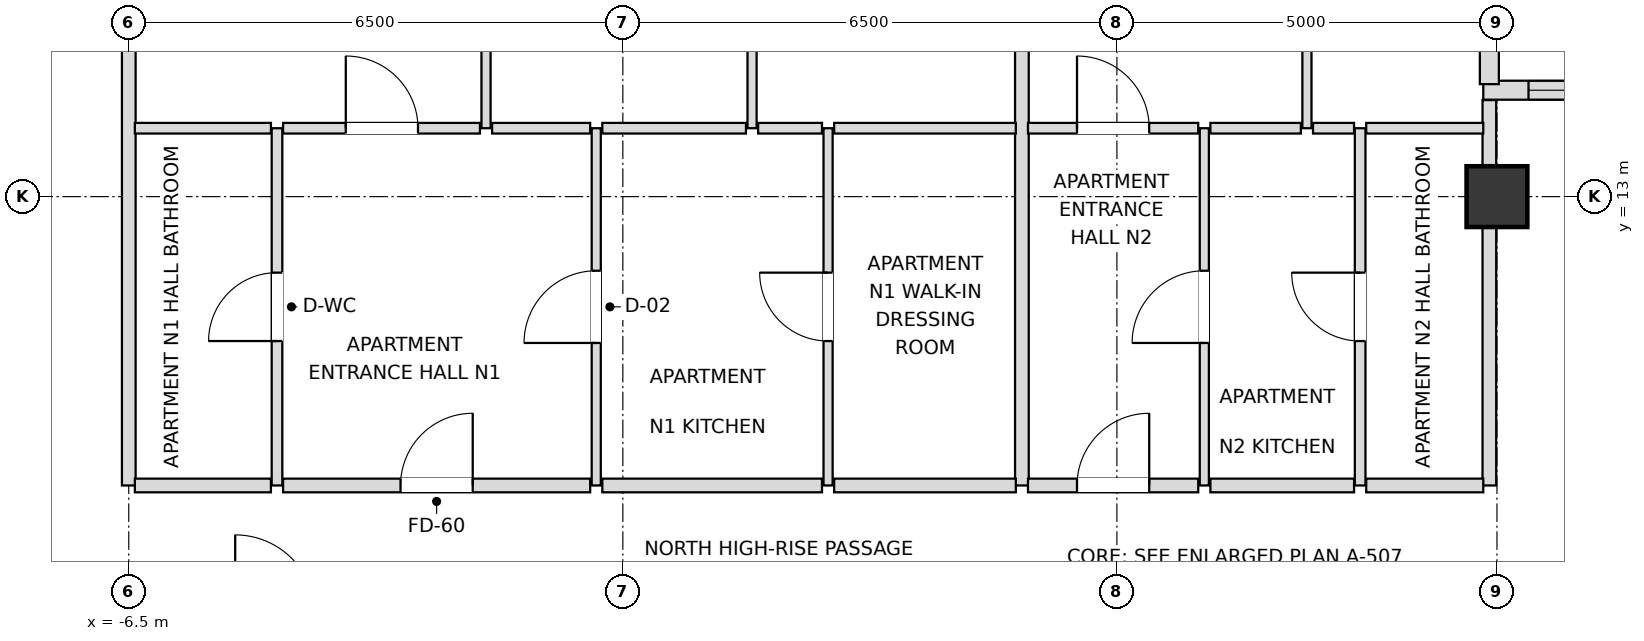
"""IFC4 building model, lengths in metres.
Left out: names, types, materials, properties, quantities, classifications, styles, units other than length and angle.
Written with IfcOpenShell. Run it as: python <this file> out.ifc"""

import sys

from ifc_helpers import new_model, si_unit, direction, frame, frame_2d, origin, origin_2d, place, context, subcontext, project, spatial, rectangle, extrude, element, fill, save


model = new_model("IFC4")
c1 = context("Model", 3, precision=1e-05, world=origin(), true_north=direction((0.0, 1.0)))
c2 = subcontext(c1, "Body", "Model", "MODEL_VIEW")
j1 = project(units=[si_unit("LENGTHUNIT", "METRE"), si_unit("PLANEANGLEUNIT", "RADIAN")], contexts=[c1])
p1 = place(None, origin())
s1 = spatial("IfcSite", under=j1, at=p1, CompositionType="ELEMENT")
p2 = place(p1, origin())
s2 = spatial("IfcBuilding", under=s1, at=p2, CompositionType="ELEMENT")
p3 = place(p2, frame((0.0, 0.0, 229.5)))
s3 = spatial("IfcBuildingStorey", under=s2, at=p3, CompositionType="ELEMENT", Elevation=229.5)
p4 = place(p3, frame((11.5, 13.0, 0.0), z_axis=(0.0, 0.0, 1.0), x_axis=(1.0, 0.0, 0.0)))
e1 = element("IfcColumn", 1, at=p4, inside=s3, PredefinedType="COLUMN", context=c2, shape_type="SweptSolid", body=[
    extrude(rectangle(XDim=0.8, YDim=0.8, at=origin_2d()), origin(), (0.0, 0.0, 1.0), 3.6),
])
p5 = place(p3, frame((16.98, 14.4, 0.0), z_axis=(0.0, 0.0, 1.0), x_axis=(-1.0, 0.0, 0.0)))
e2 = element("IfcWall", 2, at=p5, inside=s3, PredefinedType="SOLIDWALL", context=c2, shape_type="SweptSolid", body=[
    extrude(rectangle(XDim=5.66, YDim=0.25, at=frame_2d((2.83, 0.0))), origin(), (0.0, 0.0, 1.0), 2.748),
])
p6 = place(p5, frame((0.595, 0.0, 0.72)))
e3 = element("IfcOpeningElement", 3, at=p6, cuts=e2, PredefinedType="OPENING", context=c2, shape_type="SweptSolid", body=[
    extrude(rectangle(XDim=1.8, YDim=1.68, at=frame_2d((0.9, 0.84))), frame((0.0, 0.135, 0.0), z_axis=(0.0, -1.0, 0.0), x_axis=(1.0, 0.0, 0.0)), (0.0, 0.0, 1.0), 0.27),
])
p7 = place(p5, frame((3.265, 0.0, 0.72)))
e4 = element("IfcOpeningElement", 4, at=p7, cuts=e2, PredefinedType="OPENING", context=c2, shape_type="SweptSolid", body=[
    extrude(rectangle(XDim=1.8, YDim=1.68, at=frame_2d((0.9, 0.84))), frame((0.0, 0.135, 0.0), z_axis=(0.0, -1.0, 0.0), x_axis=(1.0, 0.0, 0.0)), (0.0, 0.0, 1.0), 0.27),
])
p8 = place(p3, frame((11.4, 14.48, 0.0), z_axis=(0.0, 0.0, 1.0), x_axis=(0.0, 1.0, 0.0)))
e5 = element("IfcWall", 5, at=p8, inside=s3, PredefinedType="SOLIDWALL", context=c2, shape_type="SweptSolid", body=[
    extrude(rectangle(XDim=5.34, YDim=0.25, at=frame_2d((2.67, 0.0))), origin(), (0.0, 0.0, 1.0), 2.748),
])
p9 = place(p8, frame((1.615, 0.0, 0.72)))
e6 = element("IfcOpeningElement", 6, at=p9, cuts=e5, PredefinedType="OPENING", context=c2, shape_type="SweptSolid", body=[
    extrude(rectangle(XDim=1.8, YDim=1.68, at=frame_2d((0.9, 0.84))), frame((0.0, 0.135, 0.0), z_axis=(0.0, -1.0, 0.0), x_axis=(1.0, 0.0, 0.0)), (0.0, 0.0, 1.0), 0.27),
])
p10 = place(p3, frame((-6.5, 9.2, 0.0), z_axis=(0.0, 0.0, 1.0), x_axis=(0.0, 1.0, 0.0)))
e7 = element("IfcWall", 7, at=p10, inside=s3, PredefinedType="PARTITIONING", context=c2, shape_type="SweptSolid", body=[
    extrude(rectangle(XDim=10.7, YDim=0.18, at=frame_2d((5.35, 0.0))), origin(), (0.0, 0.0, 1.0), 2.826),
])
p11 = place(p3, frame((-4.55, 9.2, 0.0), z_axis=(0.0, 0.0, 1.0), x_axis=(0.0, 1.0, 0.0)))
e8 = element("IfcWall", 8, at=p11, inside=s3, PredefinedType="PARTITIONING", context=c2, shape_type="SweptSolid", body=[
    extrude(rectangle(XDim=4.7, YDim=0.14, at=frame_2d((2.35, 0.0))), origin(), (0.0, 0.0, 1.0), 3.38),
])
p12 = place(p11, frame((1.9, 0.0, 0.0)))
e9 = element("IfcOpeningElement", 9, at=p12, cuts=e8, PredefinedType="OPENING", context=c2, shape_type="SweptSolid", body=[
    extrude(rectangle(XDim=0.9, YDim=2.1, at=frame_2d((0.45, 1.05))), frame((0.0, 0.08, 0.0), z_axis=(0.0, -1.0, 0.0), x_axis=(1.0, 0.0, 0.0)), (0.0, 0.0, 1.0), 0.16),
])
p13 = place(p3, frame((-1.8, 13.9, 0.0), z_axis=(0.0, 0.0, 1.0), x_axis=(0.0, 1.0, 0.0)))
e10 = element("IfcWall", 10, at=p13, inside=s3, PredefinedType="PARTITIONING", context=c2, shape_type="SweptSolid", body=[
    extrude(rectangle(XDim=6.0, YDim=0.12, at=frame_2d((3.0, 0.0))), origin(), (0.0, 0.0, 1.0), 3.018),
])
p14 = place(p13, frame((2.55, 0.0, 0.0)))
e11 = element("IfcOpeningElement", 11, at=p14, cuts=e10, PredefinedType="OPENING", context=c2, shape_type="SweptSolid", body=[
    extrude(rectangle(XDim=0.9, YDim=2.1, at=frame_2d((0.45, 1.05))), frame((0.0, 0.07, 0.0), z_axis=(0.0, -1.0, 0.0), x_axis=(1.0, 0.0, 0.0)), (0.0, 0.0, 1.0), 0.14),
])
p15 = place(p3, frame((-0.35, 9.2, 0.0), z_axis=(0.0, 0.0, 1.0), x_axis=(0.0, 1.0, 0.0)))
e12 = element("IfcWall", 12, at=p15, inside=s3, PredefinedType="PARTITIONING", context=c2, shape_type="SweptSolid", body=[
    extrude(rectangle(XDim=4.7, YDim=0.12, at=frame_2d((2.35, 0.0))), origin(), (0.0, 0.0, 1.0), 3.38),
])
p16 = place(p15, frame((1.875, 0.0, 0.0)))
e13 = element("IfcOpeningElement", 13, at=p16, cuts=e12, PredefinedType="OPENING", context=c2, shape_type="SweptSolid", body=[
    extrude(rectangle(XDim=0.95, YDim=2.1, at=frame_2d((0.475, 1.05))), frame((0.0, 0.07, 0.0), z_axis=(0.0, -1.0, 0.0), x_axis=(1.0, 0.0, 0.0)), (0.0, 0.0, 1.0), 0.14),
])
p17 = place(p3, frame((1.7, 13.9, 0.0), z_axis=(0.0, 0.0, 1.0), x_axis=(0.0, 1.0, 0.0)))
e14 = element("IfcWall", 14, at=p17, inside=s3, PredefinedType="PARTITIONING", context=c2, shape_type="SweptSolid", body=[
    extrude(rectangle(XDim=6.0, YDim=0.12, at=frame_2d((3.0, 0.0))), origin(), (0.0, 0.0, 1.0), 3.018),
])
p18 = place(p17, frame((2.55, 0.0, 0.0)))
e15 = element("IfcOpeningElement", 15, at=p18, cuts=e14, PredefinedType="OPENING", context=c2, shape_type="SweptSolid", body=[
    extrude(rectangle(XDim=0.9, YDim=2.1, at=frame_2d((0.45, 1.05))), frame((0.0, 0.07, 0.0), z_axis=(0.0, -1.0, 0.0), x_axis=(1.0, 0.0, 0.0)), (0.0, 0.0, 1.0), 0.14),
])
p19 = place(p3, frame((2.7, 9.2, 0.0), z_axis=(0.0, 0.0, 1.0), x_axis=(0.0, 1.0, 0.0)))
e16 = element("IfcWall", 16, at=p19, inside=s3, PredefinedType="PARTITIONING", context=c2, shape_type="SweptSolid", body=[
    extrude(rectangle(XDim=4.7, YDim=0.12, at=frame_2d((2.35, 0.0))), origin(), (0.0, 0.0, 1.0), 3.38),
])
p20 = place(p19, frame((1.9, 0.0, 0.0)))
e17 = element("IfcOpeningElement", 17, at=p20, cuts=e16, PredefinedType="OPENING", context=c2, shape_type="SweptSolid", body=[
    extrude(rectangle(XDim=0.9, YDim=2.1, at=frame_2d((0.45, 1.05))), frame((0.0, 0.07, 0.0), z_axis=(0.0, -1.0, 0.0), x_axis=(1.0, 0.0, 0.0)), (0.0, 0.0, 1.0), 0.14),
])
p21 = place(p3, frame((5.25, 9.2, 0.0), z_axis=(0.0, 0.0, 1.0), x_axis=(0.0, 1.0, 0.0)))
e18 = element("IfcWall", 18, at=p21, inside=s3, PredefinedType="PARTITIONING", context=c2, shape_type="SweptSolid", body=[
    extrude(rectangle(XDim=10.7, YDim=0.18, at=frame_2d((5.35, 0.0))), origin(), (0.0, 0.0, 1.0), 3.018),
])
p22 = place(p3, frame((7.65, 9.2, 0.0), z_axis=(0.0, 0.0, 1.0), x_axis=(0.0, 1.0, 0.0)))
e19 = element("IfcWall", 19, at=p22, inside=s3, PredefinedType="PARTITIONING", context=c2, shape_type="SweptSolid", body=[
    extrude(rectangle(XDim=4.7, YDim=0.12, at=frame_2d((2.35, 0.0))), origin(), (0.0, 0.0, 1.0), 2.826),
])
p23 = place(p22, frame((1.875, 0.0, 0.0)))
e20 = element("IfcOpeningElement", 20, at=p23, cuts=e19, PredefinedType="OPENING", context=c2, shape_type="SweptSolid", body=[
    extrude(rectangle(XDim=0.95, YDim=2.1, at=frame_2d((0.475, 1.05))), frame((0.0, 0.07, 0.0), z_axis=(0.0, -1.0, 0.0), x_axis=(1.0, 0.0, 0.0)), (0.0, 0.0, 1.0), 0.14),
])
p24 = place(p3, frame((9.0, 13.9, 0.0), z_axis=(0.0, 0.0, 1.0), x_axis=(0.0, 1.0, 0.0)))
e21 = element("IfcWall", 21, at=p24, inside=s3, PredefinedType="PARTITIONING", context=c2, shape_type="SweptSolid", body=[
    extrude(rectangle(XDim=6.0, YDim=0.12, at=frame_2d((3.0, 0.0))), origin(), (0.0, 0.0, 1.0), 3.38),
])
p25 = place(p24, frame((2.55, 0.0, 0.0)))
e22 = element("IfcOpeningElement", 22, at=p25, cuts=e21, PredefinedType="OPENING", context=c2, shape_type="SweptSolid", body=[
    extrude(rectangle(XDim=0.9, YDim=2.1, at=frame_2d((0.45, 1.05))), frame((0.0, 0.07, 0.0), z_axis=(0.0, -1.0, 0.0), x_axis=(1.0, 0.0, 0.0)), (0.0, 0.0, 1.0), 0.14),
])
p26 = place(p3, frame((9.7, 9.2, 0.0), z_axis=(0.0, 0.0, 1.0), x_axis=(0.0, 1.0, 0.0)))
e23 = element("IfcWall", 23, at=p26, inside=s3, PredefinedType="PARTITIONING", context=c2, shape_type="SweptSolid", body=[
    extrude(rectangle(XDim=4.7, YDim=0.14, at=frame_2d((2.35, 0.0))), origin(), (0.0, 0.0, 1.0), 2.826),
])
p27 = place(p26, frame((1.9, 0.0, 0.0)))
e24 = element("IfcOpeningElement", 24, at=p27, cuts=e23, PredefinedType="OPENING", context=c2, shape_type="SweptSolid", body=[
    extrude(rectangle(XDim=0.9, YDim=2.1, at=frame_2d((0.45, 1.05))), frame((0.0, 0.08, 0.0), z_axis=(0.0, -1.0, 0.0), x_axis=(1.0, 0.0, 0.0)), (0.0, 0.0, 1.0), 0.16),
])
p28 = place(p3, frame((11.4, 9.2, 0.0), z_axis=(0.0, 0.0, 1.0), x_axis=(0.0, 1.0, 0.0)))
e25 = element("IfcWall", 25, at=p28, inside=s3, PredefinedType="PARTITIONING", context=c2, shape_type="SweptSolid", body=[
    extrude(rectangle(XDim=5.07, YDim=0.18, at=frame_2d((2.535, 0.0))), origin(), (0.0, 0.0, 1.0), 2.748),
])
p29 = place(p3, frame((-6.42, 9.2, 0.0), z_axis=(0.0, 0.0, 1.0), x_axis=(1.0, 0.0, 0.0)))
e26 = element("IfcWall", 26, at=p29, inside=s3, PredefinedType="PARTITIONING", context=c2, shape_type="SweptSolid", body=[
    extrude(rectangle(XDim=1.79, YDim=0.18, at=frame_2d((0.895, 0.0))), origin(), (0.0, 0.0, 1.0), 3.38),
])
p30 = place(p3, frame((-4.47, 9.2, 0.0), z_axis=(0.0, 0.0, 1.0), x_axis=(1.0, 0.0, 0.0)))
e27 = element("IfcWall", 27, at=p30, inside=s3, PredefinedType="PARTITIONING", context=c2, shape_type="SweptSolid", body=[
    extrude(rectangle(XDim=4.04, YDim=0.18, at=frame_2d((2.02, 0.0))), origin(), (0.0, 0.0, 1.0), 3.38),
])
p31 = place(p30, frame((1.545, 0.0, 0.0)))
e28 = element("IfcOpeningElement", 28, at=p31, cuts=e27, PredefinedType="OPENING", context=c2, shape_type="SweptSolid", body=[
    extrude(rectangle(XDim=0.95, YDim=2.15, at=frame_2d((0.475, 1.075))), frame((0.0, 0.1, 0.0), z_axis=(0.0, -1.0, 0.0), x_axis=(1.0, 0.0, 0.0)), (0.0, 0.0, 1.0), 0.2),
])
p32 = place(p3, frame((-0.27, 9.2, 0.0), z_axis=(0.0, 0.0, 1.0), x_axis=(1.0, 0.0, 0.0)))
e29 = element("IfcWall", 29, at=p32, inside=s3, PredefinedType="PARTITIONING", context=c2, shape_type="SweptSolid", body=[
    extrude(rectangle(XDim=2.89, YDim=0.18, at=frame_2d((1.445, 0.0))), origin(), (0.0, 0.0, 1.0), 3.38),
])
p33 = place(p3, frame((2.78, 9.2, 0.0), z_axis=(0.0, 0.0, 1.0), x_axis=(1.0, 0.0, 0.0)))
e30 = element("IfcWall", 30, at=p33, inside=s3, PredefinedType="PARTITIONING", context=c2, shape_type="SweptSolid", body=[
    extrude(rectangle(XDim=2.39, YDim=0.18, at=frame_2d((1.195, 0.0))), origin(), (0.0, 0.0, 1.0), 3.38),
])
p34 = place(p3, frame((5.33, 9.2, 0.0), z_axis=(0.0, 0.0, 1.0), x_axis=(1.0, 0.0, 0.0)))
e31 = element("IfcWall", 31, at=p34, inside=s3, PredefinedType="PARTITIONING", context=c2, shape_type="SweptSolid", body=[
    extrude(rectangle(XDim=2.24, YDim=0.18, at=frame_2d((1.12, 0.0))), origin(), (0.0, 0.0, 1.0), 2.826),
])
p35 = place(p34, frame((0.645, 0.0, 0.0)))
e32 = element("IfcOpeningElement", 32, at=p35, cuts=e31, PredefinedType="OPENING", context=c2, shape_type="SweptSolid", body=[
    extrude(rectangle(XDim=0.95, YDim=2.15, at=frame_2d((0.475, 1.075))), frame((0.0, 0.1, 0.0), z_axis=(0.0, -1.0, 0.0), x_axis=(1.0, 0.0, 0.0)), (0.0, 0.0, 1.0), 0.2),
])
p36 = place(p3, frame((7.73, 9.2, 0.0), z_axis=(0.0, 0.0, 1.0), x_axis=(1.0, 0.0, 0.0)))
e33 = element("IfcWall", 33, at=p36, inside=s3, PredefinedType="PARTITIONING", context=c2, shape_type="SweptSolid", body=[
    extrude(rectangle(XDim=1.89, YDim=0.18, at=frame_2d((0.945, 0.0))), origin(), (0.0, 0.0, 1.0), 3.38),
])
p37 = place(p3, frame((9.78, 9.2, 0.0), z_axis=(0.0, 0.0, 1.0), x_axis=(1.0, 0.0, 0.0)))
e34 = element("IfcWall", 34, at=p37, inside=s3, PredefinedType="PARTITIONING", context=c2, shape_type="SweptSolid", body=[
    extrude(rectangle(XDim=1.54, YDim=0.18, at=frame_2d((0.77, 0.0))), origin(), (0.0, 0.0, 1.0), 3.38),
])
p38 = place(p3, frame((-6.42, 13.9, 0.0), z_axis=(0.0, 0.0, 1.0), x_axis=(1.0, 0.0, 0.0)))
e35 = element("IfcWall", 35, at=p38, inside=s3, PredefinedType="PARTITIONING", context=c2, shape_type="SweptSolid", body=[
    extrude(rectangle(XDim=1.79, YDim=0.14, at=frame_2d((0.895, 0.0))), origin(), (0.0, 0.0, 1.0), 3.38),
])
p39 = place(p3, frame((-4.47, 13.9, 0.0), z_axis=(0.0, 0.0, 1.0), x_axis=(1.0, 0.0, 0.0)))
e36 = element("IfcWall", 36, at=p39, inside=s3, PredefinedType="PARTITIONING", context=c2, shape_type="SweptSolid", body=[
    extrude(rectangle(XDim=2.59, YDim=0.14, at=frame_2d((1.295, 0.0))), origin(), (0.0, 0.0, 1.0), 3.38),
])
p40 = place(p39, frame((0.825, 0.0, 0.0)))
e37 = element("IfcOpeningElement", 37, at=p40, cuts=e36, PredefinedType="OPENING", context=c2, shape_type="SweptSolid", body=[
    extrude(rectangle(XDim=0.95, YDim=2.1, at=frame_2d((0.475, 1.05))), frame((0.0, 0.08, 0.0), z_axis=(0.0, -1.0, 0.0), x_axis=(1.0, 0.0, 0.0)), (0.0, 0.0, 1.0), 0.16),
])
p41 = place(p3, frame((-1.72, 13.9, 0.0), z_axis=(0.0, 0.0, 1.0), x_axis=(1.0, 0.0, 0.0)))
e38 = element("IfcWall", 38, at=p41, inside=s3, PredefinedType="PARTITIONING", context=c2, shape_type="SweptSolid", body=[
    extrude(rectangle(XDim=1.29, YDim=0.14, at=frame_2d((0.645, 0.0))), origin(), (0.0, 0.0, 1.0), 3.38),
])
p42 = place(p3, frame((-0.27, 13.9, 0.0), z_axis=(0.0, 0.0, 1.0), x_axis=(1.0, 0.0, 0.0)))
e39 = element("IfcWall", 39, at=p42, inside=s3, PredefinedType="PARTITIONING", context=c2, shape_type="SweptSolid", body=[
    extrude(rectangle(XDim=1.89, YDim=0.14, at=frame_2d((0.945, 0.0))), origin(), (0.0, 0.0, 1.0), 3.38),
])
p43 = place(p3, frame((1.78, 13.9, 0.0), z_axis=(0.0, 0.0, 1.0), x_axis=(1.0, 0.0, 0.0)))
e40 = element("IfcWall", 40, at=p43, inside=s3, PredefinedType="PARTITIONING", context=c2, shape_type="SweptSolid", body=[
    extrude(rectangle(XDim=0.84, YDim=0.14, at=frame_2d((0.42, 0.0))), origin(), (0.0, 0.0, 1.0), 3.38),
])
p44 = place(p3, frame((2.78, 13.9, 0.0), z_axis=(0.0, 0.0, 1.0), x_axis=(1.0, 0.0, 0.0)))
e41 = element("IfcWall", 41, at=p44, inside=s3, PredefinedType="PARTITIONING", context=c2, shape_type="SweptSolid", body=[
    extrude(rectangle(XDim=2.39, YDim=0.14, at=frame_2d((1.195, 0.0))), origin(), (0.0, 0.0, 1.0), 3.38),
])
p45 = place(p3, frame((5.33, 13.9, 0.0), z_axis=(0.0, 0.0, 1.0), x_axis=(1.0, 0.0, 0.0)))
e42 = element("IfcWall", 42, at=p45, inside=s3, PredefinedType="PARTITIONING", context=c2, shape_type="SweptSolid", body=[
    extrude(rectangle(XDim=2.24, YDim=0.14, at=frame_2d((1.12, 0.0))), origin(), (0.0, 0.0, 1.0), 2.826),
])
p46 = place(p45, frame((0.645, 0.0, 0.0)))
e43 = element("IfcOpeningElement", 43, at=p46, cuts=e42, PredefinedType="OPENING", context=c2, shape_type="SweptSolid", body=[
    extrude(rectangle(XDim=0.95, YDim=2.1, at=frame_2d((0.475, 1.05))), frame((0.0, 0.08, 0.0), z_axis=(0.0, -1.0, 0.0), x_axis=(1.0, 0.0, 0.0)), (0.0, 0.0, 1.0), 0.16),
])
p47 = place(p3, frame((7.73, 13.9, 0.0), z_axis=(0.0, 0.0, 1.0), x_axis=(1.0, 0.0, 0.0)))
e44 = element("IfcWall", 44, at=p47, inside=s3, PredefinedType="PARTITIONING", context=c2, shape_type="SweptSolid", body=[
    extrude(rectangle(XDim=1.19, YDim=0.14, at=frame_2d((0.595, 0.0))), origin(), (0.0, 0.0, 1.0), 3.38),
])
p48 = place(p3, frame((9.08, 13.9, 0.0), z_axis=(0.0, 0.0, 1.0), x_axis=(1.0, 0.0, 0.0)))
e45 = element("IfcWall", 45, at=p48, inside=s3, PredefinedType="PARTITIONING", context=c2, shape_type="SweptSolid", body=[
    extrude(rectangle(XDim=0.54, YDim=0.14, at=frame_2d((0.27, 0.0))), origin(), (0.0, 0.0, 1.0), 3.38),
])
p49 = place(p3, frame((9.78, 13.9, 0.0), z_axis=(0.0, 0.0, 1.0), x_axis=(1.0, 0.0, 0.0)))
e46 = element("IfcWall", 46, at=p49, inside=s3, PredefinedType="PARTITIONING", context=c2, shape_type="SweptSolid", body=[
    extrude(rectangle(XDim=1.54, YDim=0.14, at=frame_2d((0.77, 0.0))), origin(), (0.0, 0.0, 1.0), 3.38),
])
p50 = place(p7, origin())
e47 = element("IfcWindow", 47, at=p50, inside=s3, PartitioningType="SINGLE_PANEL", PredefinedType="WINDOW", context=c2, shape_type="SweptSolid", body=[
    extrude(rectangle(XDim=1.8, YDim=1.68, at=frame_2d((0.9, 0.84))), frame((0.0, 0.03, 0.0), z_axis=(0.0, -1.0, 0.0), x_axis=(1.0, 0.0, 0.0)), (0.0, 0.0, 1.0), 0.06),
])
fill(e4, e47)
p51 = place(p12, origin())
e48 = element("IfcDoor", 48, at=p51, inside=s3, OperationType="SINGLE_SWING_LEFT", PredefinedType="DOOR", context=c2, shape_type="SweptSolid", body=[
    extrude(rectangle(XDim=0.9, YDim=2.1, at=frame_2d((0.45, 1.05))), frame((0.0, 0.025, 0.0), z_axis=(0.0, -1.0, 0.0), x_axis=(1.0, 0.0, 0.0)), (0.0, 0.0, 1.0), 0.05),
])
fill(e9, e48)
p52 = place(p31, origin())
e49 = element("IfcDoor", 49, at=p52, inside=s3, OperationType="SINGLE_SWING_RIGHT", PredefinedType="DOOR", context=c2, shape_type="SweptSolid", body=[
    extrude(rectangle(XDim=0.95, YDim=2.15, at=frame_2d((0.475, 1.075))), frame((0.0, 0.025, 0.0), z_axis=(0.0, -1.0, 0.0), x_axis=(1.0, 0.0, 0.0)), (0.0, 0.0, 1.0), 0.05),
])
fill(e28, e49)
p53 = place(p16, origin())
e50 = element("IfcDoor", 50, at=p53, inside=s3, OperationType="SINGLE_SWING_LEFT", PredefinedType="DOOR", context=c2, shape_type="SweptSolid", body=[
    extrude(rectangle(XDim=0.95, YDim=2.1, at=frame_2d((0.475, 1.05))), frame((0.0, 0.025, 0.0), z_axis=(0.0, -1.0, 0.0), x_axis=(1.0, 0.0, 0.0)), (0.0, 0.0, 1.0), 0.05),
])
fill(e13, e50)
p54 = place(p20, origin())
e51 = element("IfcDoor", 51, at=p54, inside=s3, OperationType="SINGLE_SWING_RIGHT", PredefinedType="DOOR", context=c2, shape_type="SweptSolid", body=[
    extrude(rectangle(XDim=0.9, YDim=2.1, at=frame_2d((0.45, 1.05))), frame((0.0, 0.025, 0.0), z_axis=(0.0, -1.0, 0.0), x_axis=(1.0, 0.0, 0.0)), (0.0, 0.0, 1.0), 0.05),
])
fill(e17, e51)
p55 = place(p40, origin())
e52 = element("IfcDoor", 52, at=p55, inside=s3, OperationType="SINGLE_SWING_LEFT", PredefinedType="DOOR", context=c2, shape_type="SweptSolid", body=[
    extrude(rectangle(XDim=0.95, YDim=2.1, at=frame_2d((0.475, 1.05))), frame((0.0, 0.025, 0.0), z_axis=(0.0, -1.0, 0.0), x_axis=(1.0, 0.0, 0.0)), (0.0, 0.0, 1.0), 0.05),
])
fill(e37, e52)
p56 = place(p35, origin())
e53 = element("IfcDoor", 53, at=p56, inside=s3, OperationType="SINGLE_SWING_RIGHT", PredefinedType="DOOR", context=c2, shape_type="SweptSolid", body=[
    extrude(rectangle(XDim=0.95, YDim=2.15, at=frame_2d((0.475, 1.075))), frame((0.0, 0.025, 0.0), z_axis=(0.0, -1.0, 0.0), x_axis=(1.0, 0.0, 0.0)), (0.0, 0.0, 1.0), 0.05),
])
fill(e32, e53)
p57 = place(p23, origin())
e54 = element("IfcDoor", 54, at=p57, inside=s3, OperationType="SINGLE_SWING_LEFT", PredefinedType="DOOR", context=c2, shape_type="SweptSolid", body=[
    extrude(rectangle(XDim=0.95, YDim=2.1, at=frame_2d((0.475, 1.05))), frame((0.0, 0.025, 0.0), z_axis=(0.0, -1.0, 0.0), x_axis=(1.0, 0.0, 0.0)), (0.0, 0.0, 1.0), 0.05),
])
fill(e20, e54)
p58 = place(p27, origin())
e55 = element("IfcDoor", 55, at=p58, inside=s3, OperationType="SINGLE_SWING_RIGHT", PredefinedType="DOOR", context=c2, shape_type="SweptSolid", body=[
    extrude(rectangle(XDim=0.9, YDim=2.1, at=frame_2d((0.45, 1.05))), frame((0.0, 0.025, 0.0), z_axis=(0.0, -1.0, 0.0), x_axis=(1.0, 0.0, 0.0)), (0.0, 0.0, 1.0), 0.05),
])
fill(e24, e55)
p59 = place(p46, origin())
e56 = element("IfcDoor", 56, at=p59, inside=s3, OperationType="SINGLE_SWING_LEFT", PredefinedType="DOOR", context=c2, shape_type="SweptSolid", body=[
    extrude(rectangle(XDim=0.95, YDim=2.1, at=frame_2d((0.475, 1.05))), frame((0.0, 0.025, 0.0), z_axis=(0.0, -1.0, 0.0), x_axis=(1.0, 0.0, 0.0)), (0.0, 0.0, 1.0), 0.05),
])
fill(e43, e56)
save(model, sys.argv[1])
